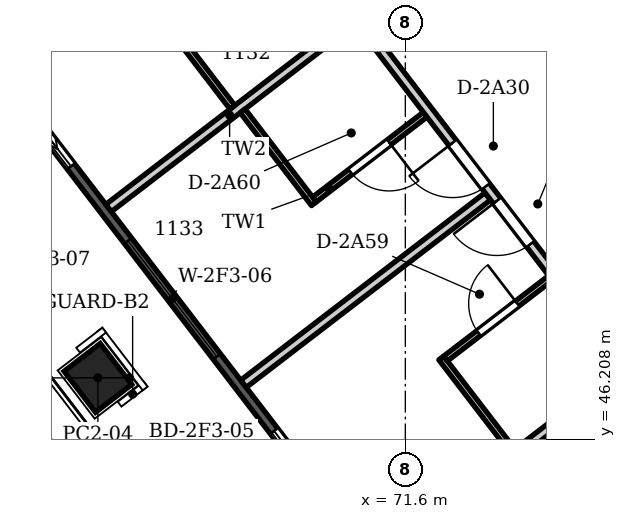
"""IFC4 building model, lengths in metres.
Left out: names, types, materials, properties, quantities, classifications, styles, units other than length and angle.
Written with IfcOpenShell. Run it as: python <this file> out.ifc"""

import sys

from ifc_helpers import new_model, si_unit, direction, frame, frame_2d, origin, origin_2d, place, context, subcontext, project, spatial, polyline, rectangle, outline, extrude, element, fill, save


model = new_model("IFC4")
c1 = context("Model", 3, precision=1e-05, world=origin(), true_north=direction((0.0, 1.0)))
c2 = subcontext(c1, "Body", "Model", "MODEL_VIEW")
j1 = project(units=[si_unit("LENGTHUNIT", "METRE"), si_unit("PLANEANGLEUNIT", "RADIAN")], contexts=[c1])
p1 = place(None, origin())
s1 = spatial("IfcSite", under=j1, at=p1, CompositionType="ELEMENT")
p2 = place(p1, origin())
s2 = spatial("IfcBuilding", under=s1, at=p2, CompositionType="ELEMENT")
p3 = place(p2, frame((0.0, 0.0, 50.4)))
s3 = spatial("IfcBuildingStorey", under=s2, at=p3, CompositionType="ELEMENT", Elevation=50.4)
p4 = place(p3, frame((72.239, 54.958, 0.0), z_axis=(0.0, 0.0, 1.0), x_axis=(0.866037463336, -0.499979111662, 0.0)))
e1 = element("IfcWall", 1, at=p4, inside=s3, PredefinedType="SHEAR", context=c2, shape_type="SweptSolid", body=[
    extrude(outline(polyline([(0.0, -0.6), (5.901, -0.6), (5.58, 0.6), (0.322, 0.6), (0.0, -0.6)])), origin(), (0.0, 0.0, 1.0), 3.6),
])
p5 = place(p4, frame((1.177, 0.0, 0.0)))
e2 = element("IfcOpeningElement", 2, at=p5, cuts=e1, PredefinedType="OPENING", context=c2, shape_type="SweptSolid", body=[
    extrude(rectangle(XDim=0.9, YDim=2.1, at=frame_2d((0.45, 1.05))), frame((0.0, 0.61, 0.0), z_axis=(0.0, -1.0, 0.0), x_axis=(1.0, 0.0, 0.0)), (0.0, 0.0, 1.0), 1.22),
])
p6 = place(p3, frame((66.544, 47.221, -0.35), z_axis=(0.0, 0.0, 1.0), x_axis=(-0.608761429009, 0.793353340291, 0.0)))
e3 = element("IfcColumn", 3, at=p6, inside=s3, PredefinedType="COLUMN", context=c2, shape_type="SweptSolid", body=[
    extrude(rectangle(XDim=0.85, YDim=0.75, at=origin_2d()), origin(), (0.0, 0.0, 1.0), 3.95),
])
p7 = place(p3, frame((79.969, 32.624, 0.0), z_axis=(0.0, 0.0, 1.0), x_axis=(-0.608761526367, 0.793353265585, 0.0)))
e4 = element("IfcWall", 4, at=p7, inside=s3, PredefinedType="SOLIDWALL", context=c2, shape_type="SweptSolid", body=[
    extrude(outline(polyline([(0.149, 0.075), (0.149, -0.075), (47.217, -0.075), (47.217, 0.075), (0.149, 0.075)])), origin(), (0.0, 0.0, 1.0), 3.3),
])
p8 = place(p7, frame((1.222, 0.0, 0.0)))
e5 = element("IfcOpeningElement", 5, at=p8, cuts=e4, PredefinedType="OPENING", context=c2, shape_type="SweptSolid", body=[
    extrude(rectangle(XDim=1.8, YDim=2.6, at=frame_2d((0.9, 1.3))), frame((0.0, 0.085, 0.0), z_axis=(0.0, -1.0, 0.0), x_axis=(1.0, 0.0, 0.0)), (0.0, 0.0, 1.0), 0.17),
])
p9 = place(p7, frame((4.565, 0.0, 0.0)))
e6 = element("IfcOpeningElement", 6, at=p9, cuts=e4, PredefinedType="OPENING", context=c2, shape_type="SweptSolid", body=[
    extrude(rectangle(XDim=1.8, YDim=2.6, at=frame_2d((0.9, 1.3))), frame((0.0, 0.085, 0.0), z_axis=(0.0, -1.0, 0.0), x_axis=(1.0, 0.0, 0.0)), (0.0, 0.0, 1.0), 0.17),
])
p10 = place(p7, frame((8.209, 0.0, 0.0)))
e7 = element("IfcOpeningElement", 7, at=p10, cuts=e4, PredefinedType="OPENING", context=c2, shape_type="SweptSolid", body=[
    extrude(rectangle(XDim=1.8, YDim=2.6, at=frame_2d((0.9, 1.3))), frame((0.0, 0.085, 0.0), z_axis=(0.0, -1.0, 0.0), x_axis=(1.0, 0.0, 0.0)), (0.0, 0.0, 1.0), 0.17),
])
p11 = place(p7, frame((12.453, 0.0, 0.0)))
e8 = element("IfcOpeningElement", 8, at=p11, cuts=e4, PredefinedType="OPENING", context=c2, shape_type="SweptSolid", body=[
    extrude(rectangle(XDim=1.8, YDim=2.6, at=frame_2d((0.9, 1.3))), frame((0.0, 0.085, 0.0), z_axis=(0.0, -1.0, 0.0), x_axis=(1.0, 0.0, 0.0)), (0.0, 0.0, 1.0), 0.17),
])
p12 = place(p7, frame((15.496, 0.0, 0.0)))
e9 = element("IfcOpeningElement", 9, at=p12, cuts=e4, PredefinedType="OPENING", context=c2, shape_type="SweptSolid", body=[
    extrude(rectangle(XDim=1.8, YDim=2.6, at=frame_2d((0.9, 1.3))), frame((0.0, 0.085, 0.0), z_axis=(0.0, -1.0, 0.0), x_axis=(1.0, 0.0, 0.0)), (0.0, 0.0, 1.0), 0.17),
])
p13 = place(p7, frame((18.84, 0.0, 0.15)))
e10 = element("IfcOpeningElement", 10, at=p13, cuts=e4, PredefinedType="OPENING", context=c2, shape_type="SweptSolid", body=[
    extrude(rectangle(XDim=2.4, YDim=2.45, at=frame_2d((1.2, 1.225))), frame((0.0, 0.085, 0.0), z_axis=(0.0, -1.0, 0.0), x_axis=(1.0, 0.0, 0.0)), (0.0, 0.0, 1.0), 0.17),
])
p14 = place(p7, frame((22.783, 0.0, 0.0)))
e11 = element("IfcOpeningElement", 11, at=p14, cuts=e4, PredefinedType="OPENING", context=c2, shape_type="SweptSolid", body=[
    extrude(rectangle(XDim=1.8, YDim=2.6, at=frame_2d((0.9, 1.3))), frame((0.0, 0.085, 0.0), z_axis=(0.0, -1.0, 0.0), x_axis=(1.0, 0.0, 0.0)), (0.0, 0.0, 1.0), 0.17),
])
p15 = place(p7, frame((26.127, 0.0, 0.15)))
e12 = element("IfcOpeningElement", 12, at=p15, cuts=e4, PredefinedType="OPENING", context=c2, shape_type="SweptSolid", body=[
    extrude(rectangle(XDim=2.4, YDim=2.45, at=frame_2d((1.2, 1.225))), frame((0.0, 0.085, 0.0), z_axis=(0.0, -1.0, 0.0), x_axis=(1.0, 0.0, 0.0)), (0.0, 0.0, 1.0), 0.17),
])
p16 = place(p7, frame((30.071, 0.0, 0.0)))
e13 = element("IfcOpeningElement", 13, at=p16, cuts=e4, PredefinedType="OPENING", context=c2, shape_type="SweptSolid", body=[
    extrude(rectangle(XDim=1.8, YDim=2.6, at=frame_2d((0.9, 1.3))), frame((0.0, 0.085, 0.0), z_axis=(0.0, -1.0, 0.0), x_axis=(1.0, 0.0, 0.0)), (0.0, 0.0, 1.0), 0.17),
])
p17 = place(p7, frame((33.114, 0.0, 0.0)))
e14 = element("IfcOpeningElement", 14, at=p17, cuts=e4, PredefinedType="OPENING", context=c2, shape_type="SweptSolid", body=[
    extrude(rectangle(XDim=1.8, YDim=2.6, at=frame_2d((0.9, 1.3))), frame((0.0, 0.085, 0.0), z_axis=(0.0, -1.0, 0.0), x_axis=(1.0, 0.0, 0.0)), (0.0, 0.0, 1.0), 0.17),
])
p18 = place(p7, frame((37.358, 0.0, 0.0)))
e15 = element("IfcOpeningElement", 15, at=p18, cuts=e4, PredefinedType="OPENING", context=c2, shape_type="SweptSolid", body=[
    extrude(rectangle(XDim=1.8, YDim=2.6, at=frame_2d((0.9, 1.3))), frame((0.0, 0.085, 0.0), z_axis=(0.0, -1.0, 0.0), x_axis=(1.0, 0.0, 0.0)), (0.0, 0.0, 1.0), 0.17),
])
p19 = place(p7, frame((41.001, 0.0, 0.0)))
e16 = element("IfcOpeningElement", 16, at=p19, cuts=e4, PredefinedType="OPENING", context=c2, shape_type="SweptSolid", body=[
    extrude(rectangle(XDim=1.8, YDim=2.6, at=frame_2d((0.9, 1.3))), frame((0.0, 0.085, 0.0), z_axis=(0.0, -1.0, 0.0), x_axis=(1.0, 0.0, 0.0)), (0.0, 0.0, 1.0), 0.17),
])
p20 = place(p7, frame((44.345, 0.0, 0.0)))
e17 = element("IfcOpeningElement", 17, at=p20, cuts=e4, PredefinedType="OPENING", context=c2, shape_type="SweptSolid", body=[
    extrude(rectangle(XDim=1.8, YDim=2.6, at=frame_2d((0.9, 1.3))), frame((0.0, 0.085, 0.0), z_axis=(0.0, -1.0, 0.0), x_axis=(1.0, 0.0, 0.0)), (0.0, 0.0, 1.0), 0.17),
])
p21 = place(p3, origin())
e18 = element("IfcWall", 18, at=p21, inside=s3, PredefinedType="PARAPET", context=c2, shape_type="SweptSolid", body=[
    extrude(outline(polyline([(61.885, 52.307), (76.536, 26.931), (76.709, 27.231), (63.284, 50.483), (61.885, 52.307)])), origin(), (0.0, 0.0, 1.0), 1.1),
])
p22 = place(p3, frame((66.72, 50.014, 0.0), z_axis=(0.0, 0.0, 1.0), x_axis=(0.793383103562, 0.608722638796, 0.0)))
e19 = element("IfcWall", 19, at=p22, inside=s3, PredefinedType="PARTITIONING", context=c2, shape_type="SweptSolid", body=[
    extrude(rectangle(XDim=5.017, YDim=0.15, at=frame_2d((2.509, 0.0))), origin(), (0.0, 0.0, 1.0), 3.3),
])
p23 = place(p3, frame((67.585, 53.199, 0.0), z_axis=(0.0, 0.0, 1.0), x_axis=(0.608404928037, -0.793626765892, 0.0)))
e20 = element("IfcWall", 20, at=p23, inside=s3, PredefinedType="PARTITIONING", context=c2, shape_type="SweptSolid", body=[
    extrude(rectangle(XDim=1.926, YDim=0.1, at=frame_2d((0.963, 0.0))), origin(), (0.0, 0.0, 1.0), 3.3),
])
p24 = place(p3, frame((68.925, 51.612, 0.0), z_axis=(0.0, 0.0, 1.0), x_axis=(0.608649853766, -0.793438942522, 0.0)))
e21 = element("IfcWall", 21, at=p24, inside=s3, PredefinedType="PARTITIONING", context=c2, shape_type="SweptSolid", body=[
    extrude(rectangle(XDim=1.925, YDim=0.1, at=frame_2d((0.962, 0.0))), origin(), (0.0, 0.0, 1.0), 3.3),
])
p25 = place(p3, frame((68.938, 47.123, 0.0), z_axis=(0.0, 0.0, 1.0), x_axis=(0.793351017656, 0.608764455913, 0.0)))
e22 = element("IfcWall", 22, at=p25, inside=s3, PredefinedType="PARTITIONING", context=c2, shape_type="SweptSolid", body=[
    extrude(rectangle(XDim=5.064, YDim=0.15, at=frame_2d((2.532, 0.0))), origin(), (0.0, 0.0, 1.0), 3.3),
])
p26 = place(p3, frame((70.106, 50.154, 0.0), z_axis=(0.0, 0.0, 1.0), x_axis=(0.793486347076, 0.608588051972, 0.0)))
e23 = element("IfcWall", 23, at=p26, inside=s3, PredefinedType="PARTITIONING", context=c2, shape_type="SweptSolid", body=[
    extrude(rectangle(XDim=2.292, YDim=0.1, at=frame_2d((1.146, 0.0))), origin(), (0.0, 0.0, 1.0), 3.3),
])
p27 = place(p26, frame((0.746, 0.0, 0.0)))
e24 = element("IfcOpeningElement", 24, at=p27, cuts=e23, PredefinedType="OPENING", context=c2, shape_type="SweptSolid", body=[
    extrude(rectangle(XDim=0.8, YDim=2.1, at=frame_2d((0.4, 1.05))), frame((0.0, 0.06, 0.0), z_axis=(0.0, -1.0, 0.0), x_axis=(1.0, 0.0, 0.0)), (0.0, 0.0, 1.0), 0.12),
])
p28 = place(p3, frame((71.088, 52.766, 0.0), z_axis=(0.0, 0.0, 1.0), x_axis=(0.608663951432, -0.793428127953, 0.0)))
e25 = element("IfcWall", 25, at=p28, inside=s3, PredefinedType="PARTITIONING", context=c2, shape_type="SweptSolid", body=[
    extrude(rectangle(XDim=17.817, YDim=0.15, at=frame_2d((8.909, 0.0))), origin(), (0.0, 0.0, 1.0), 3.3),
])
p29 = place(p28, frame((13.048, 0.0, 0.0)))
e26 = element("IfcOpeningElement", 26, at=p29, cuts=e25, PredefinedType="OPENING", context=c2, shape_type="SweptSolid", body=[
    extrude(rectangle(XDim=0.9, YDim=2.1, at=frame_2d((0.45, 1.05))), frame((0.0, 0.085, 0.0), z_axis=(0.0, -1.0, 0.0), x_axis=(1.0, 0.0, 0.0)), (0.0, 0.0, 1.0), 0.17),
])
p30 = place(p28, frame((8.133, 0.0, 0.0)))
e27 = element("IfcOpeningElement", 27, at=p30, cuts=e25, PredefinedType="OPENING", context=c2, shape_type="SweptSolid", body=[
    extrude(rectangle(XDim=1.0, YDim=2.1, at=frame_2d((0.5, 1.05))), frame((0.0, 0.085, 0.0), z_axis=(0.0, -1.0, 0.0), x_axis=(1.0, 0.0, 0.0)), (0.0, 0.0, 1.0), 0.17),
])
p31 = place(p28, frame((3.318, 0.0, 0.0)))
e28 = element("IfcOpeningElement", 28, at=p31, cuts=e25, PredefinedType="OPENING", context=c2, shape_type="SweptSolid", body=[
    extrude(rectangle(XDim=0.9, YDim=2.1, at=frame_2d((0.45, 1.05))), frame((0.0, 0.085, 0.0), z_axis=(0.0, -1.0, 0.0), x_axis=(1.0, 0.0, 0.0)), (0.0, 0.0, 1.0), 0.17),
])
p32 = place(p28, frame((2.118, 0.0, 0.0)))
e29 = element("IfcOpeningElement", 29, at=p32, cuts=e25, PredefinedType="OPENING", context=c2, shape_type="SweptSolid", body=[
    extrude(rectangle(XDim=0.9, YDim=2.1, at=frame_2d((0.45, 1.05))), frame((0.0, 0.085, 0.0), z_axis=(0.0, -1.0, 0.0), x_axis=(1.0, 0.0, 0.0)), (0.0, 0.0, 1.0), 0.17),
])
p33 = place(p3, frame((72.191, 47.548, 0.0), z_axis=(0.0, 0.0, 1.0), x_axis=(0.608711106948, -0.793391951231, 0.0)))
e30 = element("IfcWall", 30, at=p33, inside=s3, PredefinedType="PARTITIONING", context=c2, shape_type="SweptSolid", body=[
    extrude(rectangle(XDim=1.925, YDim=0.1, at=frame_2d((0.962, 0.0))), origin(), (0.0, 0.0, 1.0), 3.3),
])
p34 = place(p3, frame((72.261, 47.538, 0.0), z_axis=(0.0, 0.0, 1.0), x_axis=(0.79342025342, 0.608674216197, 0.0)))
e31 = element("IfcWall", 31, at=p34, inside=s3, PredefinedType="PARTITIONING", context=c2, shape_type="SweptSolid", body=[
    extrude(rectangle(XDim=2.175, YDim=0.1, at=frame_2d((1.088, 0.0))), origin(), (0.0, 0.0, 1.0), 3.3),
])
p35 = place(p34, frame((0.688, 0.0, 0.0)))
e32 = element("IfcOpeningElement", 32, at=p35, cuts=e31, PredefinedType="OPENING", context=c2, shape_type="SweptSolid", body=[
    extrude(rectangle(XDim=0.8, YDim=2.1, at=frame_2d((0.4, 1.05))), frame((0.0, 0.06, 0.0), z_axis=(0.0, -1.0, 0.0), x_axis=(1.0, 0.0, 0.0)), (0.0, 0.0, 1.0), 0.12),
])
p36 = place(p3, frame((73.405, 45.959, 0.0), z_axis=(0.0, 0.0, 1.0), x_axis=(0.793486460679, 0.608587903856, 0.0)))
e33 = element("IfcWall", 33, at=p36, inside=s3, PredefinedType="PARTITIONING", context=c2, shape_type="SweptSolid", body=[
    extrude(rectangle(XDim=2.229, YDim=0.15, at=frame_2d((1.114, 0.0))), origin(), (0.0, 0.0, 1.0), 3.3),
])
p37 = place(p12, origin())
e34 = element("IfcDoor", 34, at=p37, inside=s3, OperationType="SLIDING_TO_LEFT", PredefinedType="DOOR", context=c2, shape_type="SweptSolid", body=[
    extrude(rectangle(XDim=1.8, YDim=2.6, at=frame_2d((0.9, 1.3))), frame((0.0, 0.025, 0.0), z_axis=(0.0, -1.0, 0.0), x_axis=(1.0, 0.0, 0.0)), (0.0, 0.0, 1.0), 0.05),
])
fill(e9, e34)
p38 = place(p13, origin())
e35 = element("IfcWindow", 35, at=p38, inside=s3, PartitioningType="SINGLE_PANEL", PredefinedType="WINDOW", context=c2, shape_type="SweptSolid", body=[
    extrude(rectangle(XDim=2.4, YDim=2.45, at=frame_2d((1.2, 1.225))), frame((0.0, 0.03, 0.0), z_axis=(0.0, -1.0, 0.0), x_axis=(1.0, 0.0, 0.0)), (0.0, 0.0, 1.0), 0.06),
])
fill(e10, e35)
p39 = place(p14, origin())
e36 = element("IfcDoor", 36, at=p39, inside=s3, OperationType="SLIDING_TO_LEFT", PredefinedType="DOOR", context=c2, shape_type="SweptSolid", body=[
    extrude(rectangle(XDim=1.8, YDim=2.6, at=frame_2d((0.9, 1.3))), frame((0.0, 0.025, 0.0), z_axis=(0.0, -1.0, 0.0), x_axis=(1.0, 0.0, 0.0)), (0.0, 0.0, 1.0), 0.05),
])
fill(e11, e36)
p40 = place(p31, frame((0.9, 0.0, 0.0), z_axis=(0.0, 0.0, 1.0), x_axis=(-1.0, 0.0, 0.0)))
e37 = element("IfcDoor", 37, at=p40, inside=s3, OperationType="SINGLE_SWING_RIGHT", PredefinedType="DOOR", context=c2, shape_type="SweptSolid", body=[
    extrude(rectangle(XDim=0.9, YDim=2.1, at=frame_2d((0.45, 1.05))), frame((0.0, 0.025, 0.0), z_axis=(0.0, -1.0, 0.0), x_axis=(1.0, 0.0, 0.0)), (0.0, 0.0, 1.0), 0.05),
])
fill(e28, e37)
p41 = place(p32, frame((0.9, 0.0, 0.0), z_axis=(0.0, 0.0, 1.0), x_axis=(-1.0, 0.0, 0.0)))
e38 = element("IfcDoor", 38, at=p41, inside=s3, OperationType="SINGLE_SWING_RIGHT", PredefinedType="DOOR", context=c2, shape_type="SweptSolid", body=[
    extrude(rectangle(XDim=0.9, YDim=2.1, at=frame_2d((0.45, 1.05))), frame((0.0, 0.025, 0.0), z_axis=(0.0, -1.0, 0.0), x_axis=(1.0, 0.0, 0.0)), (0.0, 0.0, 1.0), 0.05),
])
fill(e29, e38)
p42 = place(p35, origin())
e39 = element("IfcDoor", 39, at=p42, inside=s3, OperationType="SINGLE_SWING_RIGHT", PredefinedType="DOOR", context=c2, shape_type="SweptSolid", body=[
    extrude(rectangle(XDim=0.8, YDim=2.1, at=frame_2d((0.4, 1.05))), frame((0.0, 0.025, 0.0), z_axis=(0.0, -1.0, 0.0), x_axis=(1.0, 0.0, 0.0)), (0.0, 0.0, 1.0), 0.05),
])
fill(e32, e39)
p43 = place(p27, frame((0.8, 0.0, 0.0), z_axis=(0.0, 0.0, 1.0), x_axis=(-1.0, 0.0, 0.0)))
e40 = element("IfcDoor", 40, at=p43, inside=s3, OperationType="SINGLE_SWING_LEFT", PredefinedType="DOOR", context=c2, shape_type="SweptSolid", body=[
    extrude(rectangle(XDim=0.8, YDim=2.1, at=frame_2d((0.4, 1.05))), frame((0.0, 0.025, 0.0), z_axis=(0.0, -1.0, 0.0), x_axis=(1.0, 0.0, 0.0)), (0.0, 0.0, 1.0), 0.05),
])
fill(e24, e40)
save(model, sys.argv[1])
